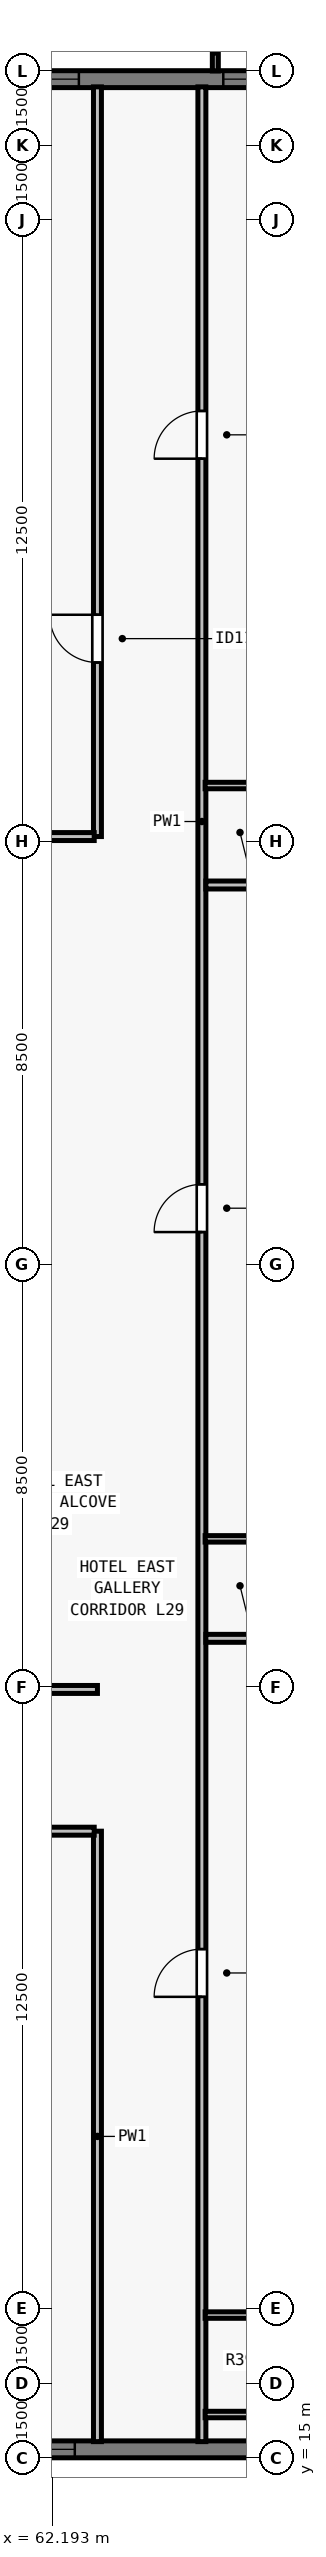
"""IFC4 building model, lengths in metres.
Left out: names, types, materials, properties, quantities, classifications, styles, units other than length and angle.
Written with IfcOpenShell. Run it as: python <this file> out.ifc"""

import sys

from ifc_helpers import new_model, si_unit, direction, frame, frame_2d, origin, place, context, subcontext, project, spatial, rectangle, extrude, element, fill, save


model = new_model("IFC4")
c1 = context("Model", 3, precision=1e-05, world=origin(), true_north=direction((0.0, 1.0)))
c2 = subcontext(c1, "Body", "Model", "MODEL_VIEW")
j1 = project(units=[si_unit("LENGTHUNIT", "METRE"), si_unit("PLANEANGLEUNIT", "RADIAN")], contexts=[c1])
p1 = place(None, origin())
s1 = spatial("IfcSite", under=j1, at=p1, CompositionType="ELEMENT")
p2 = place(p1, origin())
s2 = spatial("IfcBuilding", under=s1, at=p2, CompositionType="ELEMENT")
p3 = place(p2, frame((0.0, 0.0, 109.5)))
s3 = spatial("IfcBuildingStorey", under=s2, at=p3, CompositionType="ELEMENT", Elevation=109.5)
p4 = place(p3, frame((32.0, 62.83, 0.0), z_axis=(0.0, 0.0, 1.0), x_axis=(1.0, 0.0, 0.0)))
e1 = element("IfcWall", 1, at=p4, inside=s3, PredefinedType="SOLIDWALL", context=c2, shape_type="SweptSolid", body=[
    extrude(rectangle(XDim=39.682, YDim=0.34, at=frame_2d((19.841, 0.0))), origin(), (0.0, 0.0, 1.0), 3.28),
])
p5 = place(p4, frame((4.302, 0.0, 0.8)))
e2 = element("IfcOpeningElement", 2, at=p5, cuts=e1, PredefinedType="OPENING", context=c2, shape_type="SweptSolid", body=[
    extrude(rectangle(XDim=1.75, YDim=1.66, at=frame_2d((0.875, 0.83))), frame((0.0, 0.18, 0.0), z_axis=(0.0, -1.0, 0.0), x_axis=(1.0, 0.0, 0.0)), (0.0, 0.0, 1.0), 0.36),
])
p6 = place(p4, frame((9.355, 0.0, 0.8)))
e3 = element("IfcOpeningElement", 3, at=p6, cuts=e1, PredefinedType="OPENING", context=c2, shape_type="SweptSolid", body=[
    extrude(rectangle(XDim=1.35, YDim=1.66, at=frame_2d((0.675, 0.83))), frame((0.0, 0.18, 0.0), z_axis=(0.0, -1.0, 0.0), x_axis=(1.0, 0.0, 0.0)), (0.0, 0.0, 1.0), 0.36),
])
p7 = place(p4, frame((11.859, 0.0, 0.8)))
e4 = element("IfcOpeningElement", 4, at=p7, cuts=e1, PredefinedType="OPENING", context=c2, shape_type="SweptSolid", body=[
    extrude(rectangle(XDim=1.75, YDim=1.66, at=frame_2d((0.875, 0.83))), frame((0.0, 0.18, 0.0), z_axis=(0.0, -1.0, 0.0), x_axis=(1.0, 0.0, 0.0)), (0.0, 0.0, 1.0), 0.36),
])
p8 = place(p4, frame((18.966, 0.0, 0.8)))
e5 = element("IfcOpeningElement", 5, at=p8, cuts=e1, PredefinedType="OPENING", context=c2, shape_type="SweptSolid", body=[
    extrude(rectangle(XDim=1.75, YDim=1.66, at=frame_2d((0.875, 0.83))), frame((0.0, 0.18, 0.0), z_axis=(0.0, -1.0, 0.0), x_axis=(1.0, 0.0, 0.0)), (0.0, 0.0, 1.0), 0.36),
])
p9 = place(p4, frame((21.469, 0.0, 0.8)))
e6 = element("IfcOpeningElement", 6, at=p9, cuts=e1, PredefinedType="OPENING", context=c2, shape_type="SweptSolid", body=[
    extrude(rectangle(XDim=1.35, YDim=1.66, at=frame_2d((0.675, 0.83))), frame((0.0, 0.18, 0.0), z_axis=(0.0, -1.0, 0.0), x_axis=(1.0, 0.0, 0.0)), (0.0, 0.0, 1.0), 0.36),
])
p10 = place(p4, frame((26.073, 0.0, 0.8)))
e7 = element("IfcOpeningElement", 7, at=p10, cuts=e1, PredefinedType="OPENING", context=c2, shape_type="SweptSolid", body=[
    extrude(rectangle(XDim=1.75, YDim=1.66, at=frame_2d((0.875, 0.83))), frame((0.0, 0.18, 0.0), z_axis=(0.0, -1.0, 0.0), x_axis=(1.0, 0.0, 0.0)), (0.0, 0.0, 1.0), 0.36),
])
p11 = place(p4, frame((29.377, 0.0, 0.8)))
e8 = element("IfcOpeningElement", 8, at=p11, cuts=e1, PredefinedType="OPENING", context=c2, shape_type="SweptSolid", body=[
    extrude(rectangle(XDim=1.35, YDim=1.66, at=frame_2d((0.675, 0.83))), frame((0.0, 0.18, 0.0), z_axis=(0.0, -1.0, 0.0), x_axis=(1.0, 0.0, 0.0)), (0.0, 0.0, 1.0), 0.36),
])
p12 = place(p4, frame((33.63, 0.0, 0.8)))
e9 = element("IfcOpeningElement", 9, at=p12, cuts=e1, PredefinedType="OPENING", context=c2, shape_type="SweptSolid", body=[
    extrude(rectangle(XDim=1.75, YDim=1.66, at=frame_2d((0.875, 0.83))), frame((0.0, 0.18, 0.0), z_axis=(0.0, -1.0, 0.0), x_axis=(1.0, 0.0, 0.0)), (0.0, 0.0, 1.0), 0.36),
])
p13 = place(p3, frame((72.0, 15.17, 0.0), z_axis=(0.0, 0.0, 1.0), x_axis=(-1.0, 0.0, 0.0)))
e10 = element("IfcWall", 10, at=p13, inside=s3, PredefinedType="SOLIDWALL", context=c2, shape_type="SweptSolid", body=[
    extrude(rectangle(XDim=39.682, YDim=0.34, at=frame_2d((19.841, 0.0))), origin(), (0.0, 0.0, 1.0), 3.28),
])
p14 = place(p13, frame((9.355, 0.0, 0.8)))
e11 = element("IfcOpeningElement", 11, at=p14, cuts=e10, PredefinedType="OPENING", context=c2, shape_type="SweptSolid", body=[
    extrude(rectangle(XDim=1.35, YDim=1.66, at=frame_2d((0.675, 0.83))), frame((0.0, 0.18, 0.0), z_axis=(0.0, -1.0, 0.0), x_axis=(1.0, 0.0, 0.0)), (0.0, 0.0, 1.0), 0.36),
])
p15 = place(p13, frame((11.859, 0.0, 0.8)))
e12 = element("IfcOpeningElement", 12, at=p15, cuts=e10, PredefinedType="OPENING", context=c2, shape_type="SweptSolid", body=[
    extrude(rectangle(XDim=1.75, YDim=1.66, at=frame_2d((0.875, 0.83))), frame((0.0, 0.18, 0.0), z_axis=(0.0, -1.0, 0.0), x_axis=(1.0, 0.0, 0.0)), (0.0, 0.0, 1.0), 0.36),
])
p16 = place(p13, frame((16.062, 0.0, 0.8)))
e13 = element("IfcOpeningElement", 13, at=p16, cuts=e10, PredefinedType="OPENING", context=c2, shape_type="SweptSolid", body=[
    extrude(rectangle(XDim=1.35, YDim=1.66, at=frame_2d((0.675, 0.83))), frame((0.0, 0.18, 0.0), z_axis=(0.0, -1.0, 0.0), x_axis=(1.0, 0.0, 0.0)), (0.0, 0.0, 1.0), 0.36),
])
p17 = place(p13, frame((18.116, 0.0, 0.8)))
e14 = element("IfcOpeningElement", 14, at=p17, cuts=e10, PredefinedType="OPENING", context=c2, shape_type="SweptSolid", body=[
    extrude(rectangle(XDim=1.75, YDim=1.66, at=frame_2d((0.875, 0.83))), frame((0.0, 0.18, 0.0), z_axis=(0.0, -1.0, 0.0), x_axis=(1.0, 0.0, 0.0)), (0.0, 0.0, 1.0), 0.36),
])
p18 = place(p13, frame((22.719, 0.0, 0.8)))
e15 = element("IfcOpeningElement", 15, at=p18, cuts=e10, PredefinedType="OPENING", context=c2, shape_type="SweptSolid", body=[
    extrude(rectangle(XDim=1.35, YDim=1.66, at=frame_2d((0.675, 0.83))), frame((0.0, 0.18, 0.0), z_axis=(0.0, -1.0, 0.0), x_axis=(1.0, 0.0, 0.0)), (0.0, 0.0, 1.0), 0.36),
])
p19 = place(p13, frame((26.073, 0.0, 0.8)))
e16 = element("IfcOpeningElement", 16, at=p19, cuts=e10, PredefinedType="OPENING", context=c2, shape_type="SweptSolid", body=[
    extrude(rectangle(XDim=1.75, YDim=1.66, at=frame_2d((0.875, 0.83))), frame((0.0, 0.18, 0.0), z_axis=(0.0, -1.0, 0.0), x_axis=(1.0, 0.0, 0.0)), (0.0, 0.0, 1.0), 0.36),
])
p20 = place(p13, frame((29.377, 0.0, 0.8)))
e17 = element("IfcOpeningElement", 17, at=p20, cuts=e10, PredefinedType="OPENING", context=c2, shape_type="SweptSolid", body=[
    extrude(rectangle(XDim=1.35, YDim=1.66, at=frame_2d((0.675, 0.83))), frame((0.0, 0.18, 0.0), z_axis=(0.0, -1.0, 0.0), x_axis=(1.0, 0.0, 0.0)), (0.0, 0.0, 1.0), 0.36),
])
p21 = place(p3, frame((65.2, 15.325, 0.0), z_axis=(0.0, 0.0, 1.0), x_axis=(0.0, 1.0, 0.0)))
e18 = element("IfcWall", 18, at=p21, inside=s3, PredefinedType="PARTITIONING", context=c2, shape_type="SweptSolid", body=[
    extrude(rectangle(XDim=47.35, YDim=0.16, at=frame_2d((23.675, 0.0))), origin(), (0.0, 0.0, 1.0), 2.555),
])
p22 = place(p21, frame((8.944, 0.0, 0.0)))
e19 = element("IfcOpeningElement", 19, at=p22, cuts=e18, PredefinedType="OPENING", context=c2, shape_type="SweptSolid", body=[
    extrude(rectangle(XDim=0.96, YDim=2.15, at=frame_2d((0.48, 1.075))), frame((0.0, 0.09, 0.0), z_axis=(0.0, -1.0, 0.0), x_axis=(1.0, 0.0, 0.0)), (0.0, 0.0, 1.0), 0.18),
])
p23 = place(p21, frame((24.322, 0.0, 0.0)))
e20 = element("IfcOpeningElement", 20, at=p23, cuts=e18, PredefinedType="OPENING", context=c2, shape_type="SweptSolid", body=[
    extrude(rectangle(XDim=0.96, YDim=2.15, at=frame_2d((0.48, 1.075))), frame((0.0, 0.09, 0.0), z_axis=(0.0, -1.0, 0.0), x_axis=(1.0, 0.0, 0.0)), (0.0, 0.0, 1.0), 0.18),
])
p24 = place(p21, frame((39.873, 0.0, 0.0)))
e21 = element("IfcOpeningElement", 21, at=p24, cuts=e18, PredefinedType="OPENING", context=c2, shape_type="SweptSolid", body=[
    extrude(rectangle(XDim=0.96, YDim=2.15, at=frame_2d((0.48, 1.075))), frame((0.0, 0.09, 0.0), z_axis=(0.0, -1.0, 0.0), x_axis=(1.0, 0.0, 0.0)), (0.0, 0.0, 1.0), 0.18),
])
p25 = place(p3, frame((63.1, 15.325, 0.0), z_axis=(0.0, 0.0, 1.0), x_axis=(0.0, 1.0, 0.0)))
e22 = element("IfcWall", 22, at=p25, inside=s3, PredefinedType="PARTITIONING", context=c2, shape_type="SweptSolid", body=[
    extrude(rectangle(XDim=12.275, YDim=0.16, at=frame_2d((6.138, 0.0))), origin(), (0.0, 0.0, 1.0), 2.555),
])
p26 = place(p3, frame((63.1, 47.6, 0.0), z_axis=(0.0, 0.0, 1.0), x_axis=(0.0, 1.0, 0.0)))
e23 = element("IfcWall", 23, at=p26, inside=s3, PredefinedType="PARTITIONING", context=c2, shape_type="SweptSolid", body=[
    extrude(rectangle(XDim=15.075, YDim=0.16, at=frame_2d((7.538, 0.0))), origin(), (0.0, 0.0, 1.0), 2.555),
])
p27 = place(p26, frame((3.5, 0.0, 0.0)))
e24 = element("IfcOpeningElement", 24, at=p27, cuts=e23, PredefinedType="OPENING", context=c2, shape_type="SweptSolid", body=[
    extrude(rectangle(XDim=0.96, YDim=2.12, at=frame_2d((0.48, 1.06))), frame((0.0, 0.09, 0.0), z_axis=(0.0, -1.0, 0.0), x_axis=(1.0, 0.0, 0.0)), (0.0, 0.0, 1.0), 0.18),
])
p28 = place(p3, frame((60.765, 30.45, 0.0), z_axis=(0.0, 0.0, 1.0), x_axis=(1.0, 0.0, 0.0)))
e25 = element("IfcWall", 25, at=p28, inside=s3, PredefinedType="PARTITIONING", context=c2, shape_type="SweptSolid", body=[
    extrude(rectangle(XDim=2.335, YDim=0.16, at=frame_2d((1.167, 0.0))), origin(), (0.0, 0.0, 1.0), 3.28),
])
p29 = place(p3, frame((60.765, 47.6, 0.0), z_axis=(0.0, 0.0, 1.0), x_axis=(1.0, 0.0, 0.0)))
e26 = element("IfcWall", 26, at=p29, inside=s3, PredefinedType="PARTITIONING", context=c2, shape_type="SweptSolid", body=[
    extrude(rectangle(XDim=2.27, YDim=0.16, at=frame_2d((1.135, 0.0))), origin(), (0.0, 0.0, 1.0), 3.28),
])
p30 = place(p3, frame((40.965, 27.6, 0.0), z_axis=(0.0, 0.0, 1.0), x_axis=(1.0, 0.0, 0.0)))
e27 = element("IfcWall", 27, at=p30, inside=s3, PredefinedType="PARTITIONING", context=c2, shape_type="SweptSolid", body=[
    extrude(rectangle(XDim=22.07, YDim=0.16, at=frame_2d((11.035, 0.0))), origin(), (0.0, 0.0, 1.0), 3.28),
])
p31 = place(p30, frame((6.085, 0.0, 0.0)))
e28 = element("IfcOpeningElement", 28, at=p31, cuts=e27, PredefinedType="OPENING", context=c2, shape_type="SweptSolid", body=[
    extrude(rectangle(XDim=0.96, YDim=2.15, at=frame_2d((0.48, 1.075))), frame((0.0, 0.09, 0.0), z_axis=(0.0, -1.0, 0.0), x_axis=(1.0, 0.0, 0.0)), (0.0, 0.0, 1.0), 0.18),
])
p32 = place(p30, frame((16.88, 0.0, 0.0)))
e29 = element("IfcOpeningElement", 29, at=p32, cuts=e27, PredefinedType="OPENING", context=c2, shape_type="SweptSolid", body=[
    extrude(rectangle(XDim=0.96, YDim=2.15, at=frame_2d((0.48, 1.075))), frame((0.0, 0.09, 0.0), z_axis=(0.0, -1.0, 0.0), x_axis=(1.0, 0.0, 0.0)), (0.0, 0.0, 1.0), 0.18),
])
for number, where, z_axis, x_axis in (
    (30, (65.265, 15.87, 0.0), (0.0, 0.0, 1.0), (1.0, 0.0, 0.0)),
    (31, (65.265, 17.87, 0.0), (0.0, 0.0, 1.0), (1.0, 0.0, 0.0)),
):
    element("IfcWall", number, at=place(p3, frame(where, z_axis=z_axis, x_axis=x_axis)), inside=s3, PredefinedType="PLUMBINGWALL", context=c2, shape_type="SweptSolid", body=[
        extrude(rectangle(XDim=2.315, YDim=0.13, at=frame_2d((1.158, 0.0))), origin(), (0.0, 0.0, 1.0), 3.28),
    ])
p33 = place(p3, frame((65.28, 31.478, 0.0), z_axis=(0.0, 0.0, 1.0), x_axis=(1.0, 0.0, 0.0)))
e32 = element("IfcWall", 32, at=p33, inside=s3, PredefinedType="PARTITIONING", context=c2, shape_type="SweptSolid", body=[
    extrude(rectangle(XDim=10.395, YDim=0.16, at=frame_2d((5.198, 0.0))), origin(), (0.0, 0.0, 1.0), 3.28),
])
p34 = place(p3, frame((65.265, 33.478, 0.0), z_axis=(0.0, 0.0, 1.0), x_axis=(1.0, 0.0, 0.0)))
e33 = element("IfcWall", 33, at=p34, inside=s3, PredefinedType="PLUMBINGWALL", context=c2, shape_type="SweptSolid", body=[
    extrude(rectangle(XDim=2.315, YDim=0.13, at=frame_2d((1.158, 0.0))), origin(), (0.0, 0.0, 1.0), 3.28),
])
p35 = place(p3, frame((65.28, 46.626, 0.0), z_axis=(0.0, 0.0, 1.0), x_axis=(1.0, 0.0, 0.0)))
e34 = element("IfcWall", 34, at=p35, inside=s3, PredefinedType="PARTITIONING", context=c2, shape_type="SweptSolid", body=[
    extrude(rectangle(XDim=10.395, YDim=0.16, at=frame_2d((5.198, 0.0))), origin(), (0.0, 0.0, 1.0), 3.28),
])
p36 = place(p3, frame((65.265, 48.626, 0.0), z_axis=(0.0, 0.0, 1.0), x_axis=(1.0, 0.0, 0.0)))
e35 = element("IfcWall", 35, at=p36, inside=s3, PredefinedType="PLUMBINGWALL", context=c2, shape_type="SweptSolid", body=[
    extrude(rectangle(XDim=2.315, YDim=0.13, at=frame_2d((1.158, 0.0))), origin(), (0.0, 0.0, 1.0), 3.28),
])
p37 = place(p11, origin())
e36 = element("IfcWindow", 36, at=p37, inside=s3, PartitioningType="SINGLE_PANEL", PredefinedType="WINDOW", context=c2, shape_type="SweptSolid", body=[
    extrude(rectangle(XDim=1.35, YDim=1.66, at=frame_2d((0.675, 0.83))), frame((0.0, -0.05, 0.0), z_axis=(0.0, -1.0, 0.0), x_axis=(1.0, 0.0, 0.0)), (0.0, 0.0, 1.0), 0.06),
])
fill(e8, e36)
p38 = place(p12, origin())
e37 = element("IfcWindow", 37, at=p38, inside=s3, PartitioningType="SINGLE_PANEL", PredefinedType="WINDOW", context=c2, shape_type="SweptSolid", body=[
    extrude(rectangle(XDim=1.75, YDim=1.66, at=frame_2d((0.875, 0.83))), frame((0.0, -0.05, 0.0), z_axis=(0.0, -1.0, 0.0), x_axis=(1.0, 0.0, 0.0)), (0.0, 0.0, 1.0), 0.06),
])
fill(e9, e37)
p39 = place(p14, origin())
e38 = element("IfcWindow", 38, at=p39, inside=s3, PartitioningType="SINGLE_PANEL", PredefinedType="WINDOW", context=c2, shape_type="SweptSolid", body=[
    extrude(rectangle(XDim=1.35, YDim=1.66, at=frame_2d((0.675, 0.83))), frame((0.0, -0.05, 0.0), z_axis=(0.0, -1.0, 0.0), x_axis=(1.0, 0.0, 0.0)), (0.0, 0.0, 1.0), 0.06),
])
fill(e11, e38)
p40 = place(p27, origin())
e39 = element("IfcDoor", 39, at=p40, inside=s3, OperationType="SINGLE_SWING_RIGHT", PredefinedType="DOOR", context=c2, shape_type="SweptSolid", body=[
    extrude(rectangle(XDim=0.96, YDim=2.12, at=frame_2d((0.48, 1.06))), frame((0.0, 0.025, 0.0), z_axis=(0.0, -1.0, 0.0), x_axis=(1.0, 0.0, 0.0)), (0.0, 0.0, 1.0), 0.05),
])
fill(e24, e39)
p41 = place(p22, origin())
e40 = element("IfcDoor", 40, at=p41, inside=s3, OperationType="SINGLE_SWING_LEFT", PredefinedType="DOOR", context=c2, shape_type="SweptSolid", body=[
    extrude(rectangle(XDim=0.96, YDim=2.15, at=frame_2d((0.48, 1.075))), frame((0.0, 0.025, 0.0), z_axis=(0.0, -1.0, 0.0), x_axis=(1.0, 0.0, 0.0)), (0.0, 0.0, 1.0), 0.05),
])
fill(e19, e40)
p42 = place(p23, origin())
e41 = element("IfcDoor", 41, at=p42, inside=s3, OperationType="SINGLE_SWING_LEFT", PredefinedType="DOOR", context=c2, shape_type="SweptSolid", body=[
    extrude(rectangle(XDim=0.96, YDim=2.15, at=frame_2d((0.48, 1.075))), frame((0.0, 0.025, 0.0), z_axis=(0.0, -1.0, 0.0), x_axis=(1.0, 0.0, 0.0)), (0.0, 0.0, 1.0), 0.05),
])
fill(e20, e41)
p43 = place(p24, origin())
e42 = element("IfcDoor", 42, at=p43, inside=s3, OperationType="SINGLE_SWING_LEFT", PredefinedType="DOOR", context=c2, shape_type="SweptSolid", body=[
    extrude(rectangle(XDim=0.96, YDim=2.15, at=frame_2d((0.48, 1.075))), frame((0.0, 0.025, 0.0), z_axis=(0.0, -1.0, 0.0), x_axis=(1.0, 0.0, 0.0)), (0.0, 0.0, 1.0), 0.05),
])
fill(e21, e42)
save(model, sys.argv[1])
